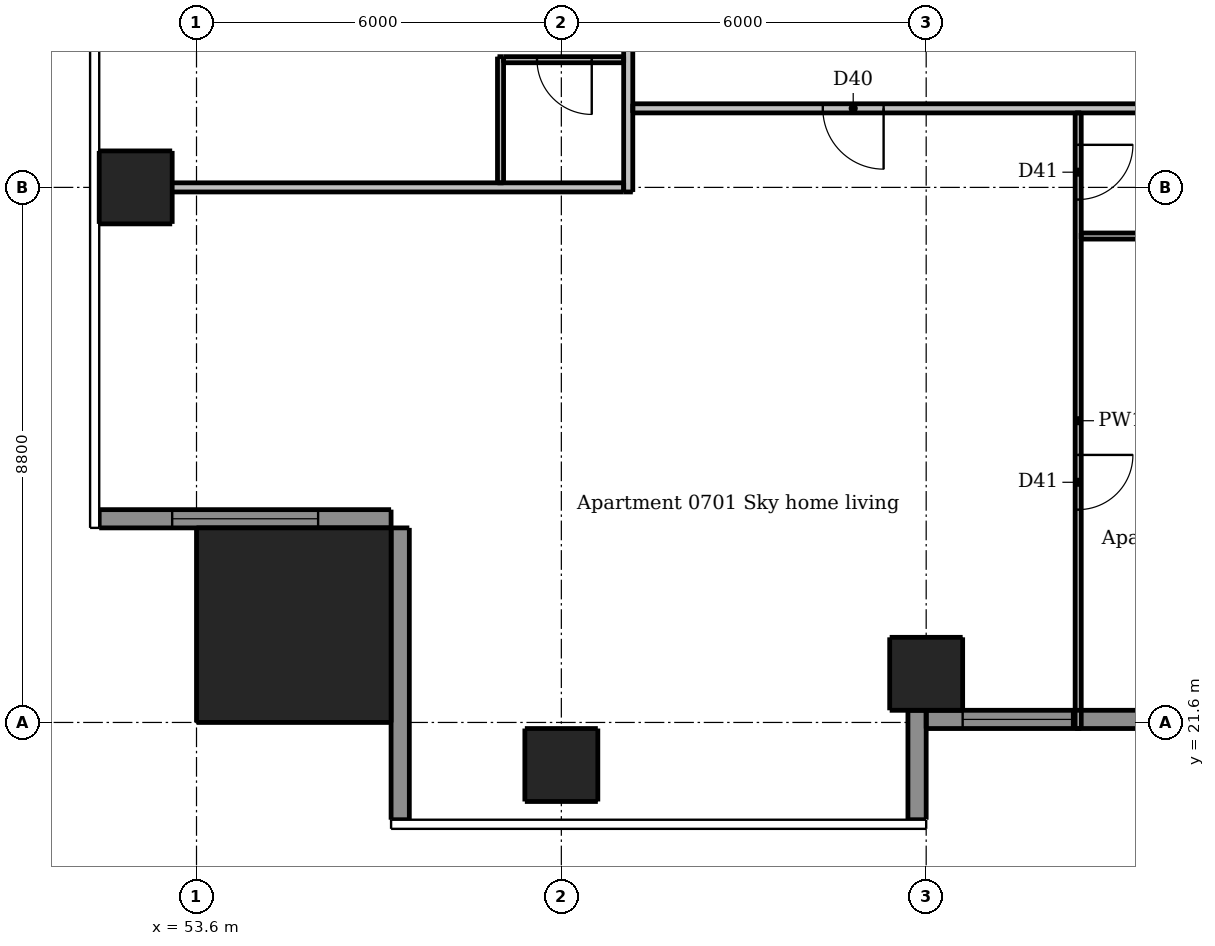
"""IFC4 building model, lengths in metres.
Left out: names, types, materials, properties, quantities, classifications, styles, units other than length and angle.
Written with IfcOpenShell. Run it as: python <this file> out.ifc"""

import sys

from ifc_helpers import new_model, si_unit, direction, frame, frame_2d, origin, origin_2d, place, context, subcontext, project, spatial, rectangle, extrude, element, fill, save


model = new_model("IFC4")
c1 = context("Model", 3, precision=1e-05, world=origin(), true_north=direction((0.0, 1.0)))
c2 = subcontext(c1, "Body", "Model", "MODEL_VIEW")
j1 = project(units=[si_unit("LENGTHUNIT", "METRE"), si_unit("PLANEANGLEUNIT", "RADIAN")], contexts=[c1])
p1 = place(None, origin())
s1 = spatial("IfcSite", under=j1, at=p1, CompositionType="ELEMENT")
p2 = place(p1, origin())
s2 = spatial("IfcBuilding", under=s1, at=p2, CompositionType="ELEMENT")
p3 = place(p2, frame((0.0, 0.0, 30.1)))
s3 = spatial("IfcBuildingStorey", under=s2, at=p3, CompositionType="ELEMENT", Elevation=30.1)
for number, where, z_axis, x_axis in (
    (1, (59.6, 20.9, 0.0), (0.0, 0.0, 1.0), (1.0, 0.0, 0.0)),
    (2, (65.6, 22.4, 0.0), (0.0, 0.0, 1.0), (1.0, 0.0, 0.0)),
    (3, (52.6, 30.4, 0.0), (0.0, 0.0, 1.0), (1.0, 0.0, 0.0)),
):
    element("IfcColumn", number, at=place(p3, frame(where, z_axis=z_axis, x_axis=x_axis)), inside=s3, PredefinedType="COLUMN", context=c2, shape_type="SweptSolid", body=[
        extrude(rectangle(XDim=1.2, YDim=1.2, at=origin_2d()), origin(), (0.0, 0.0, 1.0), 3.05),
    ])
p4 = place(p3, frame((55.2, 23.2, 0.0), z_axis=(0.0, 0.0, 1.0), x_axis=(1.0, 0.0, 0.0)))
e4 = element("IfcColumn", 4, at=p4, inside=s3, PredefinedType="COLUMN", context=c2, shape_type="SweptSolid", body=[
    extrude(rectangle(XDim=3.2, YDim=3.2, at=origin_2d()), origin(), (0.0, 0.0, 1.0), 3.3),
])
p5 = place(p3, frame((65.45, 20.0, 0.0), z_axis=(0.0, 0.0, 1.0), x_axis=(0.0, 1.0, 0.0)))
e5 = element("IfcWall", 5, at=p5, inside=s3, PredefinedType="SOLIDWALL", context=c2, shape_type="SweptSolid", body=[
    extrude(rectangle(XDim=1.8, YDim=0.3, at=frame_2d((0.9, 0.0))), origin(), (0.0, 0.0, 1.0), 3.05),
])
p6 = place(p3, frame((52.0, 24.95, 0.0), z_axis=(0.0, 0.0, 1.0), x_axis=(1.0, 0.0, 0.0)))
e6 = element("IfcWall", 6, at=p6, inside=s3, PredefinedType="SOLIDWALL", context=c2, shape_type="SweptSolid", body=[
    extrude(rectangle(XDim=4.8, YDim=0.3, at=frame_2d((2.4, 0.0))), origin(), (0.0, 0.0, 1.0), 3.05),
])
p7 = place(p6, frame((1.2, 0.0, 0.15)))
e7 = element("IfcOpeningElement", 7, at=p7, cuts=e6, PredefinedType="OPENING", context=c2, shape_type="SweptSolid", body=[
    extrude(rectangle(XDim=2.4, YDim=2.1, at=frame_2d((1.2, 1.05))), frame((0.0, 0.16, 0.0), z_axis=(0.0, -1.0, 0.0), x_axis=(1.0, 0.0, 0.0)), (0.0, 0.0, 1.0), 0.32),
])
p8 = place(p3, frame((56.95, 24.8, 0.0), z_axis=(0.0, 0.0, 1.0), x_axis=(0.0, -1.0, 0.0)))
e8 = element("IfcWall", 8, at=p8, inside=s3, PredefinedType="SOLIDWALL", context=c2, shape_type="SweptSolid", body=[
    extrude(rectangle(XDim=4.8, YDim=0.3, at=frame_2d((2.4, 0.0))), origin(), (0.0, 0.0, 1.0), 3.05),
])
p9 = place(p3, frame((65.6, 21.65, 0.0), z_axis=(0.0, 0.0, 1.0), x_axis=(1.0, 0.0, 0.0)))
e9 = element("IfcWall", 9, at=p9, inside=s3, PredefinedType="SOLIDWALL", context=c2, shape_type="SweptSolid", body=[
    extrude(rectangle(XDim=6.0, YDim=0.3, at=frame_2d((3.0, 0.0))), origin(), (0.0, 0.0, 1.0), 3.05),
])
p10 = place(p9, frame((0.6, 0.0, 0.15)))
e10 = element("IfcOpeningElement", 10, at=p10, cuts=e9, PredefinedType="OPENING", context=c2, shape_type="SweptSolid", body=[
    extrude(rectangle(XDim=1.8, YDim=2.1, at=frame_2d((0.9, 1.05))), frame((0.0, 0.16, 0.0), z_axis=(0.0, -1.0, 0.0), x_axis=(1.0, 0.0, 0.0)), (0.0, 0.0, 1.0), 0.32),
])
p11 = place(p9, frame((3.6, 0.0, 0.15)))
e11 = element("IfcOpeningElement", 11, at=p11, cuts=e9, PredefinedType="OPENING", context=c2, shape_type="SweptSolid", body=[
    extrude(rectangle(XDim=1.8, YDim=2.1, at=frame_2d((0.9, 1.05))), frame((0.0, 0.16, 0.0), z_axis=(0.0, -1.0, 0.0), x_axis=(1.0, 0.0, 0.0)), (0.0, 0.0, 1.0), 0.32),
])
p12 = place(p3, frame((58.6, 30.475, 0.0), z_axis=(0.0, 0.0, 1.0), x_axis=(0.0, 1.0, 0.0)))
e12 = element("IfcWall", 12, at=p12, inside=s3, PredefinedType="PARTITIONING", context=c2, shape_type="SweptSolid", body=[
    extrude(rectangle(XDim=2.075, YDim=0.1, at=frame_2d((1.038, 0.0))), origin(), (0.0, 0.0, 1.0), 3.05),
])
p13 = place(p3, frame((68.1, 31.625, 0.0), z_axis=(0.0, 0.0, 1.0), x_axis=(0.0, -1.0, 0.0)))
e13 = element("IfcWall", 13, at=p13, inside=s3, PredefinedType="PARTITIONING", context=c2, shape_type="SweptSolid", body=[
    extrude(rectangle(XDim=10.125, YDim=0.1, at=frame_2d((5.062, 0.0))), origin(), (0.0, 0.0, 1.0), 3.05),
])
p14 = place(p13, frame((0.525, 0.0, 0.0)))
e14 = element("IfcOpeningElement", 14, at=p14, cuts=e13, PredefinedType="OPENING", context=c2, shape_type="SweptSolid", body=[
    extrude(rectangle(XDim=0.9, YDim=2.1, at=frame_2d((0.45, 1.05))), frame((0.0, 0.06, 0.0), z_axis=(0.0, -1.0, 0.0), x_axis=(1.0, 0.0, 0.0)), (0.0, 0.0, 1.0), 0.12),
])
p15 = place(p13, frame((5.625, 0.0, 0.0)))
e15 = element("IfcOpeningElement", 15, at=p15, cuts=e13, PredefinedType="OPENING", context=c2, shape_type="SweptSolid", body=[
    extrude(rectangle(XDim=0.9, YDim=2.1, at=frame_2d((0.45, 1.05))), frame((0.0, 0.06, 0.0), z_axis=(0.0, -1.0, 0.0), x_axis=(1.0, 0.0, 0.0)), (0.0, 0.0, 1.0), 0.12),
])
p16 = place(p3, frame((60.625, 32.5, 0.0), z_axis=(0.0, 0.0, 1.0), x_axis=(-1.0, 0.0, 0.0)))
e16 = element("IfcWall", 16, at=p16, inside=s3, PredefinedType="PARTITIONING", context=c2, shape_type="SweptSolid", body=[
    extrude(rectangle(XDim=1.975, YDim=0.1, at=frame_2d((0.988, 0.0))), origin(), (0.0, 0.0, 1.0), 3.05),
])
p17 = place(p16, frame((0.525, 0.0, 0.0)))
e17 = element("IfcOpeningElement", 17, at=p17, cuts=e16, PredefinedType="OPENING", context=c2, shape_type="SweptSolid", body=[
    extrude(rectangle(XDim=0.9, YDim=2.1, at=frame_2d((0.45, 1.05))), frame((0.0, 0.06, 0.0), z_axis=(0.0, -1.0, 0.0), x_axis=(1.0, 0.0, 0.0)), (0.0, 0.0, 1.0), 0.12),
])
p18 = place(p3, frame((68.15, 29.6, 0.0), z_axis=(0.0, 0.0, 1.0), x_axis=(1.0, 0.0, 0.0)))
e18 = element("IfcWall", 18, at=p18, inside=s3, PredefinedType="PARTITIONING", context=c2, shape_type="SweptSolid", body=[
    extrude(rectangle(XDim=8.8, YDim=0.1, at=frame_2d((4.4, 0.0))), origin(), (0.0, 0.0, 1.0), 3.05),
])
p19 = place(p18, frame((4.0, 0.0, 0.0)))
e19 = element("IfcOpeningElement", 19, at=p19, cuts=e18, PredefinedType="OPENING", context=c2, shape_type="SweptSolid", body=[
    extrude(rectangle(XDim=0.8, YDim=2.1, at=frame_2d((0.4, 1.05))), frame((0.0, 0.06, 0.0), z_axis=(0.0, -1.0, 0.0), x_axis=(1.0, 0.0, 0.0)), (0.0, 0.0, 1.0), 0.12),
])
p20 = place(p18, frame((7.2, 0.0, 0.0)))
e20 = element("IfcOpeningElement", 20, at=p20, cuts=e18, PredefinedType="OPENING", context=c2, shape_type="SweptSolid", body=[
    extrude(rectangle(XDim=0.9, YDim=2.1, at=frame_2d((0.45, 1.05))), frame((0.0, 0.06, 0.0), z_axis=(0.0, -1.0, 0.0), x_axis=(1.0, 0.0, 0.0)), (0.0, 0.0, 1.0), 0.12),
])
p21 = place(p3, frame((60.7, 30.325, 0.0), z_axis=(0.0, 0.0, 1.0), x_axis=(0.0, 1.0, 0.0)))
e21 = element("IfcWall", 21, at=p21, inside=s3, PredefinedType="PARTITIONING", context=c2, shape_type="SweptSolid", body=[
    extrude(rectangle(XDim=28.9, YDim=0.15, at=frame_2d((14.45, 0.0))), origin(), (0.0, 0.0, 1.0), 3.05),
])
p22 = place(p21, frame((2.575, 0.0, 0.0)))
e22 = element("IfcOpeningElement", 22, at=p22, cuts=e21, PredefinedType="OPENING", context=c2, shape_type="SweptSolid", body=[
    extrude(rectangle(XDim=1.0, YDim=2.1, at=frame_2d((0.5, 1.05))), frame((0.0, 0.085, 0.0), z_axis=(0.0, -1.0, 0.0), x_axis=(1.0, 0.0, 0.0)), (0.0, 0.0, 1.0), 0.17),
])
p23 = place(p21, frame((8.575, 0.0, 0.0)))
e23 = element("IfcOpeningElement", 23, at=p23, cuts=e21, PredefinedType="OPENING", context=c2, shape_type="SweptSolid", body=[
    extrude(rectangle(XDim=1.0, YDim=2.1, at=frame_2d((0.5, 1.05))), frame((0.0, 0.085, 0.0), z_axis=(0.0, -1.0, 0.0), x_axis=(1.0, 0.0, 0.0)), (0.0, 0.0, 1.0), 0.17),
])
p24 = place(p21, frame((14.575, 0.0, 0.0)))
e24 = element("IfcOpeningElement", 24, at=p24, cuts=e21, PredefinedType="OPENING", context=c2, shape_type="SweptSolid", body=[
    extrude(rectangle(XDim=1.0, YDim=2.1, at=frame_2d((0.5, 1.05))), frame((0.0, 0.085, 0.0), z_axis=(0.0, -1.0, 0.0), x_axis=(1.0, 0.0, 0.0)), (0.0, 0.0, 1.0), 0.17),
])
p25 = place(p21, frame((26.025, 0.0, 0.0)))
e25 = element("IfcOpeningElement", 25, at=p25, cuts=e21, PredefinedType="OPENING", context=c2, shape_type="SweptSolid", body=[
    extrude(rectangle(XDim=1.0, YDim=2.1, at=frame_2d((0.5, 1.05))), frame((0.0, 0.085, 0.0), z_axis=(0.0, -1.0, 0.0), x_axis=(1.0, 0.0, 0.0)), (0.0, 0.0, 1.0), 0.17),
])
p26 = place(p3, frame((89.525, 31.7, 0.0), z_axis=(0.0, 0.0, 1.0), x_axis=(-1.0, 0.0, 0.0)))
e26 = element("IfcWall", 26, at=p26, inside=s3, PredefinedType="PARTITIONING", context=c2, shape_type="SweptSolid", body=[
    extrude(rectangle(XDim=28.75, YDim=0.15, at=frame_2d((14.375, 0.0))), origin(), (0.0, 0.0, 1.0), 3.05),
])
p27 = place(p26, frame((24.625, 0.0, 0.0)))
e27 = element("IfcOpeningElement", 27, at=p27, cuts=e26, PredefinedType="OPENING", context=c2, shape_type="SweptSolid", body=[
    extrude(rectangle(XDim=1.0, YDim=2.1, at=frame_2d((0.5, 1.05))), frame((0.0, 0.085, 0.0), z_axis=(0.0, -1.0, 0.0), x_axis=(1.0, 0.0, 0.0)), (0.0, 0.0, 1.0), 0.17),
])
p28 = place(p26, frame((10.225, 0.0, 0.0)))
e28 = element("IfcOpeningElement", 28, at=p28, cuts=e26, PredefinedType="OPENING", context=c2, shape_type="SweptSolid", body=[
    extrude(rectangle(XDim=1.0, YDim=2.1, at=frame_2d((0.5, 1.05))), frame((0.0, 0.085, 0.0), z_axis=(0.0, -1.0, 0.0), x_axis=(1.0, 0.0, 0.0)), (0.0, 0.0, 1.0), 0.17),
])
p29 = place(p26, frame((2.425, 0.0, 0.0)))
e29 = element("IfcOpeningElement", 29, at=p29, cuts=e26, PredefinedType="OPENING", context=c2, shape_type="SweptSolid", body=[
    extrude(rectangle(XDim=1.0, YDim=2.1, at=frame_2d((0.5, 1.05))), frame((0.0, 0.085, 0.0), z_axis=(0.0, -1.0, 0.0), x_axis=(1.0, 0.0, 0.0)), (0.0, 0.0, 1.0), 0.17),
])
p30 = place(p3, frame((52.0, 30.4, 0.0), z_axis=(0.0, 0.0, 1.0), x_axis=(1.0, 0.0, 0.0)))
e30 = element("IfcWall", 30, at=p30, inside=s3, PredefinedType="PARTITIONING", context=c2, shape_type="SweptSolid", body=[
    extrude(rectangle(XDim=8.625, YDim=0.15, at=frame_2d((4.312, 0.0))), origin(), (0.0, 0.0, 1.0), 2.647),
])
p31 = place(p7, origin())
e31 = element("IfcWindow", 31, at=p31, inside=s3, PartitioningType="DOUBLE_PANEL_VERTICAL", PredefinedType="WINDOW", context=c2, shape_type="SweptSolid", body=[
    extrude(rectangle(XDim=2.4, YDim=2.1, at=frame_2d((1.2, 1.05))), frame((0.0, 0.03, 0.0), z_axis=(0.0, -1.0, 0.0), x_axis=(1.0, 0.0, 0.0)), (0.0, 0.0, 1.0), 0.06),
])
fill(e7, e31)
p32 = place(p10, origin())
e32 = element("IfcWindow", 32, at=p32, inside=s3, PartitioningType="DOUBLE_PANEL_VERTICAL", PredefinedType="WINDOW", context=c2, shape_type="SweptSolid", body=[
    extrude(rectangle(XDim=1.8, YDim=2.1, at=frame_2d((0.9, 1.05))), frame((0.0, 0.03, 0.0), z_axis=(0.0, -1.0, 0.0), x_axis=(1.0, 0.0, 0.0)), (0.0, 0.0, 1.0), 0.06),
])
fill(e10, e32)
p33 = place(p27, origin())
e33 = element("IfcDoor", 33, at=p33, inside=s3, OperationType="SINGLE_SWING_LEFT", PredefinedType="DOOR", context=c2, shape_type="SweptSolid", body=[
    extrude(rectangle(XDim=1.0, YDim=2.1, at=frame_2d((0.5, 1.05))), frame((0.0, 0.025, 0.0), z_axis=(0.0, -1.0, 0.0), x_axis=(1.0, 0.0, 0.0)), (0.0, 0.0, 1.0), 0.05),
])
fill(e27, e33)
p34 = place(p14, origin())
e34 = element("IfcDoor", 34, at=p34, inside=s3, OperationType="SINGLE_SWING_LEFT", PredefinedType="DOOR", context=c2, shape_type="SweptSolid", body=[
    extrude(rectangle(XDim=0.9, YDim=2.1, at=frame_2d((0.45, 1.05))), frame((0.0, 0.025, 0.0), z_axis=(0.0, -1.0, 0.0), x_axis=(1.0, 0.0, 0.0)), (0.0, 0.0, 1.0), 0.05),
])
fill(e14, e34)
p35 = place(p15, origin())
e35 = element("IfcDoor", 35, at=p35, inside=s3, OperationType="SINGLE_SWING_LEFT", PredefinedType="DOOR", context=c2, shape_type="SweptSolid", body=[
    extrude(rectangle(XDim=0.9, YDim=2.1, at=frame_2d((0.45, 1.05))), frame((0.0, 0.025, 0.0), z_axis=(0.0, -1.0, 0.0), x_axis=(1.0, 0.0, 0.0)), (0.0, 0.0, 1.0), 0.05),
])
fill(e15, e35)
p36 = place(p17, origin())
e36 = element("IfcDoor", 36, at=p36, inside=s3, OperationType="SINGLE_SWING_LEFT", PredefinedType="DOOR", context=c2, shape_type="SweptSolid", body=[
    extrude(rectangle(XDim=0.9, YDim=2.1, at=frame_2d((0.45, 1.05))), frame((0.0, 0.025, 0.0), z_axis=(0.0, -1.0, 0.0), x_axis=(1.0, 0.0, 0.0)), (0.0, 0.0, 1.0), 0.05),
])
fill(e17, e36)
save(model, sys.argv[1])
